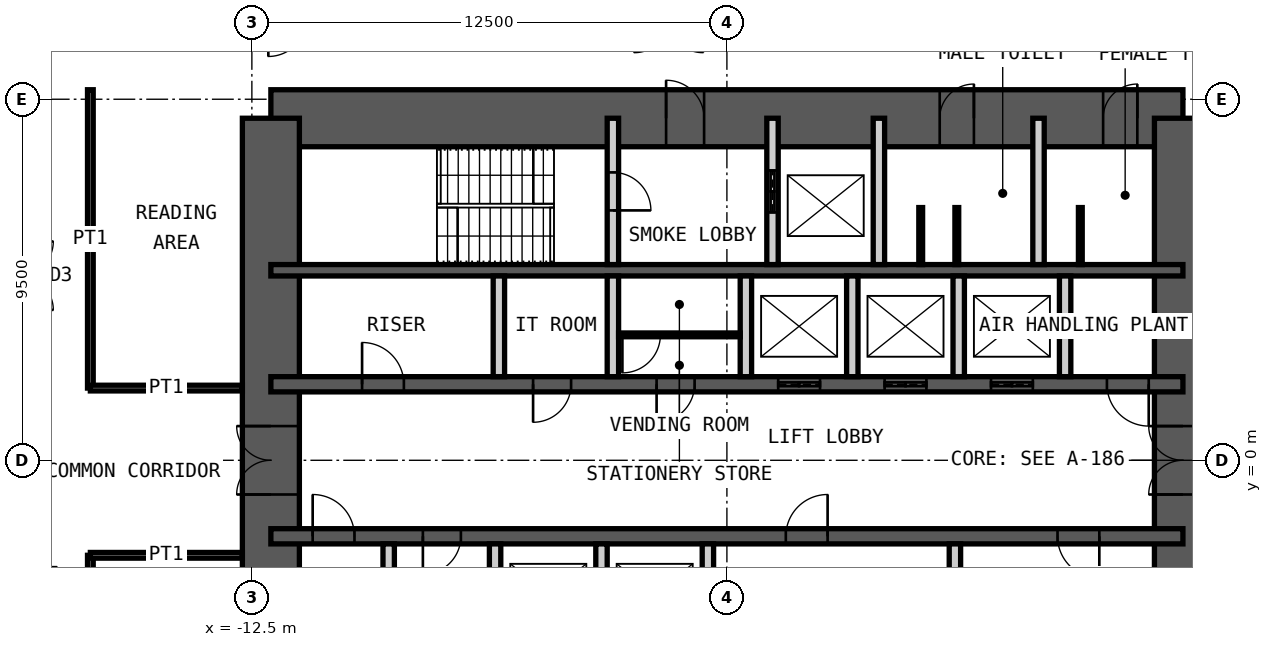
"""IFC4 building model, lengths in metres.
Left out: names, types, materials, properties, quantities, classifications, styles, units other than length and angle.
Written with IfcOpenShell. Run it as: python <this file> out.ifc"""

import sys

from ifc_helpers import new_model, si_unit, direction, frame, frame_2d, origin, place, context, subcontext, project, spatial, rectangle, extrude, element, fill, save


model = new_model("IFC4")
c1 = context("Model", 3, precision=1e-05, world=origin(), true_north=direction((0.0, 1.0)))
c2 = subcontext(c1, "Body", "Model", "MODEL_VIEW")
j1 = project(units=[si_unit("LENGTHUNIT", "METRE"), si_unit("PLANEANGLEUNIT", "RADIAN")], contexts=[c1])
p1 = place(None, origin())
s1 = spatial("IfcSite", under=j1, at=p1, CompositionType="ELEMENT")
p2 = place(p1, origin())
s2 = spatial("IfcBuilding", under=s1, at=p2, CompositionType="ELEMENT")
p3 = place(p2, frame((0.0, 0.0, 115.6)))
s3 = spatial("IfcBuildingStorey", under=s2, at=p3, CompositionType="ELEMENT", Elevation=115.6)
p4 = place(p3, frame((-12.0, 9.0, 0.0), z_axis=(0.0, 0.0, 1.0), x_axis=(1.0, 0.0, 0.0)))
e1 = element("IfcWall", 1, at=p4, inside=s3, PredefinedType="SHEAR", context=c2, shape_type="SweptSolid", body=[
    extrude(rectangle(XDim=24.0, YDim=1.5, at=frame_2d((12.0, 0.0))), origin(), (0.0, 0.0, 1.0), 4.2),
])
p5 = place(p4, frame((10.4, 0.0, 0.0)))
e2 = element("IfcOpeningElement", 2, at=p5, cuts=e1, PredefinedType="OPENING", context=c2, shape_type="SweptSolid", body=[
    extrude(rectangle(XDim=1.0, YDim=2.1, at=frame_2d((0.5, 1.05))), frame((0.0, 0.76, 0.0), z_axis=(0.0, -1.0, 0.0), x_axis=(1.0, 0.0, 0.0)), (0.0, 0.0, 1.0), 1.52),
])
p6 = place(p4, frame((17.6, 0.0, 0.0)))
e3 = element("IfcOpeningElement", 3, at=p6, cuts=e1, PredefinedType="OPENING", context=c2, shape_type="SweptSolid", body=[
    extrude(rectangle(XDim=0.9, YDim=2.1, at=frame_2d((0.45, 1.05))), frame((0.0, 0.76, 0.0), z_axis=(0.0, -1.0, 0.0), x_axis=(1.0, 0.0, 0.0)), (0.0, 0.0, 1.0), 1.52),
])
p7 = place(p4, frame((21.9, 0.0, 0.0)))
e4 = element("IfcOpeningElement", 4, at=p7, cuts=e1, PredefinedType="OPENING", context=c2, shape_type="SweptSolid", body=[
    extrude(rectangle(XDim=0.9, YDim=2.1, at=frame_2d((0.45, 1.05))), frame((0.0, 0.76, 0.0), z_axis=(0.0, -1.0, 0.0), x_axis=(1.0, 0.0, 0.0)), (0.0, 0.0, 1.0), 1.52),
])
p8 = place(p3, frame((12.0, -9.0, 0.0), z_axis=(0.0, 0.0, 1.0), x_axis=(0.0, 1.0, 0.0)))
e5 = element("IfcWall", 5, at=p8, inside=s3, PredefinedType="SHEAR", context=c2, shape_type="SweptSolid", body=[
    extrude(rectangle(XDim=18.0, YDim=1.5, at=frame_2d((9.0, 0.0))), origin(), (0.0, 0.0, 1.0), 4.2),
])
p9 = place(p8, frame((8.1, 0.0, 0.0)))
e6 = element("IfcOpeningElement", 6, at=p9, cuts=e5, PredefinedType="OPENING", context=c2, shape_type="SweptSolid", body=[
    extrude(rectangle(XDim=1.8, YDim=2.1, at=frame_2d((0.9, 1.05))), frame((0.0, 0.76, 0.0), z_axis=(0.0, -1.0, 0.0), x_axis=(1.0, 0.0, 0.0)), (0.0, 0.0, 1.0), 1.52),
])
p10 = place(p3, frame((-12.0, -9.0, 0.0), z_axis=(0.0, 0.0, 1.0), x_axis=(0.0, 1.0, 0.0)))
e7 = element("IfcWall", 7, at=p10, inside=s3, PredefinedType="SHEAR", context=c2, shape_type="SweptSolid", body=[
    extrude(rectangle(XDim=18.0, YDim=1.5, at=frame_2d((9.0, 0.0))), origin(), (0.0, 0.0, 1.0), 4.2),
])
p11 = place(p10, frame((8.1, 0.0, 0.0)))
e8 = element("IfcOpeningElement", 8, at=p11, cuts=e7, PredefinedType="OPENING", context=c2, shape_type="SweptSolid", body=[
    extrude(rectangle(XDim=1.8, YDim=2.1, at=frame_2d((0.9, 1.05))), frame((0.0, 0.76, 0.0), z_axis=(0.0, -1.0, 0.0), x_axis=(1.0, 0.0, 0.0)), (0.0, 0.0, 1.0), 1.52),
])
p12 = place(p3, frame((-12.0, 5.0, 0.0), z_axis=(0.0, 0.0, 1.0), x_axis=(1.0, 0.0, 0.0)))
e9 = element("IfcWall", 9, at=p12, inside=s3, PredefinedType="SHEAR", context=c2, shape_type="SweptSolid", body=[
    extrude(rectangle(XDim=24.0, YDim=0.3, at=frame_2d((12.0, 0.0))), origin(), (0.0, 0.0, 1.0), 4.2),
])
p13 = place(p3, frame((-12.0, 2.0, 0.0), z_axis=(0.0, 0.0, 1.0), x_axis=(1.0, 0.0, 0.0)))
e10 = element("IfcWall", 10, at=p13, inside=s3, PredefinedType="SHEAR", context=c2, shape_type="SweptSolid", body=[
    extrude(rectangle(XDim=24.0, YDim=0.4, at=frame_2d((12.0, 0.0))), origin(), (0.0, 0.0, 1.0), 4.2),
])
p14 = place(p13, frame((2.4, 0.0, 0.0)))
e11 = element("IfcOpeningElement", 11, at=p14, cuts=e10, PredefinedType="OPENING", context=c2, shape_type="SweptSolid", body=[
    extrude(rectangle(XDim=1.1, YDim=2.1, at=frame_2d((0.55, 1.05))), frame((0.0, 0.21, 0.0), z_axis=(0.0, -1.0, 0.0), x_axis=(1.0, 0.0, 0.0)), (0.0, 0.0, 1.0), 0.42),
])
p15 = place(p13, frame((22.0, 0.0, 0.0)))
e12 = element("IfcOpeningElement", 12, at=p15, cuts=e10, PredefinedType="OPENING", context=c2, shape_type="SweptSolid", body=[
    extrude(rectangle(XDim=1.1, YDim=2.1, at=frame_2d((0.55, 1.05))), frame((0.0, 0.21, 0.0), z_axis=(0.0, -1.0, 0.0), x_axis=(1.0, 0.0, 0.0)), (0.0, 0.0, 1.0), 0.42),
])
p16 = place(p13, frame((10.15, 0.0, 0.0)))
e13 = element("IfcOpeningElement", 13, at=p16, cuts=e10, PredefinedType="OPENING", context=c2, shape_type="SweptSolid", body=[
    extrude(rectangle(XDim=1.0, YDim=2.1, at=frame_2d((0.5, 1.05))), frame((0.0, 0.21, 0.0), z_axis=(0.0, -1.0, 0.0), x_axis=(1.0, 0.0, 0.0)), (0.0, 0.0, 1.0), 0.42),
])
p17 = place(p13, frame((6.9, 0.0, 0.0)))
e14 = element("IfcOpeningElement", 14, at=p17, cuts=e10, PredefinedType="OPENING", context=c2, shape_type="SweptSolid", body=[
    extrude(rectangle(XDim=1.0, YDim=2.1, at=frame_2d((0.5, 1.05))), frame((0.0, 0.21, 0.0), z_axis=(0.0, -1.0, 0.0), x_axis=(1.0, 0.0, 0.0)), (0.0, 0.0, 1.0), 0.42),
])
p18 = place(p13, frame((13.35, 0.0, 0.0)))
e15 = element("IfcOpeningElement", 15, at=p18, cuts=e10, PredefinedType="OPENING", context=c2, shape_type="SweptSolid", body=[
    extrude(rectangle(XDim=1.1, YDim=2.4, at=frame_2d((0.55, 1.2))), frame((0.0, 0.21, 0.0), z_axis=(0.0, -1.0, 0.0), x_axis=(1.0, 0.0, 0.0)), (0.0, 0.0, 1.0), 0.42),
])
p19 = place(p13, frame((16.15, 0.0, 0.0)))
e16 = element("IfcOpeningElement", 16, at=p19, cuts=e10, PredefinedType="OPENING", context=c2, shape_type="SweptSolid", body=[
    extrude(rectangle(XDim=1.1, YDim=2.4, at=frame_2d((0.55, 1.2))), frame((0.0, 0.21, 0.0), z_axis=(0.0, -1.0, 0.0), x_axis=(1.0, 0.0, 0.0)), (0.0, 0.0, 1.0), 0.42),
])
p20 = place(p13, frame((18.95, 0.0, 0.0)))
e17 = element("IfcOpeningElement", 17, at=p20, cuts=e10, PredefinedType="OPENING", context=c2, shape_type="SweptSolid", body=[
    extrude(rectangle(XDim=1.1, YDim=2.4, at=frame_2d((0.55, 1.2))), frame((0.0, 0.21, 0.0), z_axis=(0.0, -1.0, 0.0), x_axis=(1.0, 0.0, 0.0)), (0.0, 0.0, 1.0), 0.42),
])
p21 = place(p3, frame((-12.0, -2.0, 0.0), z_axis=(0.0, 0.0, 1.0), x_axis=(1.0, 0.0, 0.0)))
e18 = element("IfcWall", 18, at=p21, inside=s3, PredefinedType="SHEAR", context=c2, shape_type="SweptSolid", body=[
    extrude(rectangle(XDim=24.0, YDim=0.4, at=frame_2d((12.0, 0.0))), origin(), (0.0, 0.0, 1.0), 4.2),
])
p22 = place(p21, frame((1.1, 0.0, 0.0)))
e19 = element("IfcOpeningElement", 19, at=p22, cuts=e18, PredefinedType="OPENING", context=c2, shape_type="SweptSolid", body=[
    extrude(rectangle(XDim=1.1, YDim=2.1, at=frame_2d((0.55, 1.05))), frame((0.0, 0.21, 0.0), z_axis=(0.0, -1.0, 0.0), x_axis=(1.0, 0.0, 0.0)), (0.0, 0.0, 1.0), 0.42),
])
p23 = place(p21, frame((13.55, 0.0, 0.0)))
e20 = element("IfcOpeningElement", 20, at=p23, cuts=e18, PredefinedType="OPENING", context=c2, shape_type="SweptSolid", body=[
    extrude(rectangle(XDim=1.1, YDim=2.1, at=frame_2d((0.55, 1.05))), frame((0.0, 0.21, 0.0), z_axis=(0.0, -1.0, 0.0), x_axis=(1.0, 0.0, 0.0)), (0.0, 0.0, 1.0), 0.42),
])
p24 = place(p21, frame((20.7, 0.0, 0.0)))
e21 = element("IfcOpeningElement", 21, at=p24, cuts=e18, PredefinedType="OPENING", context=c2, shape_type="SweptSolid", body=[
    extrude(rectangle(XDim=1.1, YDim=2.1, at=frame_2d((0.55, 1.05))), frame((0.0, 0.21, 0.0), z_axis=(0.0, -1.0, 0.0), x_axis=(1.0, 0.0, 0.0)), (0.0, 0.0, 1.0), 0.42),
])
p25 = place(p21, frame((4.0, 0.0, 0.0)))
e22 = element("IfcOpeningElement", 22, at=p25, cuts=e18, PredefinedType="OPENING", context=c2, shape_type="SweptSolid", body=[
    extrude(rectangle(XDim=1.0, YDim=2.1, at=frame_2d((0.5, 1.05))), frame((0.0, 0.21, 0.0), z_axis=(0.0, -1.0, 0.0), x_axis=(1.0, 0.0, 0.0)), (0.0, 0.0, 1.0), 0.42),
])
p26 = place(p3, frame((-3.0, 5.15, 0.0), z_axis=(0.0, 0.0, 1.0), x_axis=(0.0, 1.0, 0.0)))
e23 = element("IfcWall", 23, at=p26, inside=s3, PredefinedType="PARTITIONING", context=c2, shape_type="SweptSolid", body=[
    extrude(rectangle(XDim=3.85, YDim=0.3, at=frame_2d((1.925, 0.0))), origin(), (0.0, 0.0, 1.0), 3.98),
])
p27 = place(p26, frame((1.425, 0.0, 0.0)))
e24 = element("IfcOpeningElement", 24, at=p27, cuts=e23, PredefinedType="OPENING", context=c2, shape_type="SweptSolid", body=[
    extrude(rectangle(XDim=1.0, YDim=2.1, at=frame_2d((0.5, 1.05))), frame((0.0, 0.16, 0.0), z_axis=(0.0, -1.0, 0.0), x_axis=(1.0, 0.0, 0.0)), (0.0, 0.0, 1.0), 0.32),
])
p28 = place(p3, frame((1.2, 5.15, 0.0), z_axis=(0.0, 0.0, 1.0), x_axis=(0.0, 1.0, 0.0)))
e25 = element("IfcWall", 25, at=p28, inside=s3, PredefinedType="PARTITIONING", context=c2, shape_type="SweptSolid", body=[
    extrude(rectangle(XDim=3.85, YDim=0.3, at=frame_2d((1.925, 0.0))), origin(), (0.0, 0.0, 1.0), 3.98),
])
p29 = place(p28, frame((1.375, 0.0, 0.0)))
e26 = element("IfcOpeningElement", 26, at=p29, cuts=e25, PredefinedType="OPENING", context=c2, shape_type="SweptSolid", body=[
    extrude(rectangle(XDim=1.1, YDim=2.4, at=frame_2d((0.55, 1.2))), frame((0.0, 0.16, 0.0), z_axis=(0.0, -1.0, 0.0), x_axis=(1.0, 0.0, 0.0)), (0.0, 0.0, 1.0), 0.32),
])
for number, where, z_axis, x_axis in (
    (27, (4.0, 5.15, 0.0), (0.0, 0.0, 1.0), (0.0, 1.0, 0.0)),
    (28, (8.2, 5.15, 0.0), (0.0, 0.0, 1.0), (0.0, 1.0, 0.0)),
):
    element("IfcWall", number, at=place(p3, frame(where, z_axis=z_axis, x_axis=x_axis)), inside=s3, PredefinedType="PARTITIONING", context=c2, shape_type="SweptSolid", body=[
        extrude(rectangle(XDim=3.85, YDim=0.3, at=frame_2d((1.925, 0.0))), origin(), (0.0, 0.0, 1.0), 3.98),
    ])
for number, where, z_axis, x_axis in (
    (29, (-6.0, 2.2, 0.0), (0.0, 0.0, 1.0), (0.0, 1.0, 0.0)),
    (30, (-3.0, 2.2, 0.0), (0.0, 0.0, 1.0), (0.0, 1.0, 0.0)),
    (31, (0.5, 2.2, 0.0), (0.0, 0.0, 1.0), (0.0, 1.0, 0.0)),
    (32, (3.3, 2.2, 0.0), (0.0, 0.0, 1.0), (0.0, 1.0, 0.0)),
    (33, (6.1, 2.2, 0.0), (0.0, 0.0, 1.0), (0.0, 1.0, 0.0)),
    (34, (8.9, 2.2, 0.0), (0.0, 0.0, 1.0), (0.0, 1.0, 0.0)),
    (35, (-8.9, -4.85, 0.0), (0.0, 0.0, 1.0), (0.0, 1.0, 0.0)),
    (36, (-6.1, -4.85, 0.0), (0.0, 0.0, 1.0), (0.0, 1.0, 0.0)),
    (37, (-3.3, -4.85, 0.0), (0.0, 0.0, 1.0), (0.0, 1.0, 0.0)),
    (38, (-0.5, -4.85, 0.0), (0.0, 0.0, 1.0), (0.0, 1.0, 0.0)),
    (39, (6.0, -4.85, 0.0), (0.0, 0.0, 1.0), (0.0, 1.0, 0.0)),
):
    element("IfcWall", number, at=place(p3, frame(where, z_axis=z_axis, x_axis=x_axis)), inside=s3, PredefinedType="PARTITIONING", context=c2, shape_type="SweptSolid", body=[
        extrude(rectangle(XDim=2.65, YDim=0.3, at=frame_2d((1.325, 0.0))), origin(), (0.0, 0.0, 1.0), 3.98),
    ])
p30 = place(p3, frame((-2.85, 3.3, 0.0), z_axis=(0.0, 0.0, 1.0), x_axis=(1.0, 0.0, 0.0)))
e40 = element("IfcWall", 40, at=p30, inside=s3, PredefinedType="PARTITIONING", context=c2, shape_type="SweptSolid", body=[
    extrude(rectangle(XDim=3.2, YDim=0.1, at=frame_2d((1.6, 0.0))), origin(), (0.0, 0.0, 1.0), 3.98),
])
p31 = place(p30, frame((0.1, 0.0, 0.0)))
e41 = element("IfcOpeningElement", 41, at=p31, cuts=e40, PredefinedType="OPENING", context=c2, shape_type="SweptSolid", body=[
    extrude(rectangle(XDim=1.0, YDim=2.4, at=frame_2d((0.5, 1.2))), frame((0.0, 0.06, 0.0), z_axis=(0.0, -1.0, 0.0), x_axis=(1.0, 0.0, 0.0)), (0.0, 0.0, 1.0), 0.12),
])
for number, where, z_axis, x_axis in (
    (42, (5.1, 5.15, 0.0), (0.0, 0.0, 1.0), (0.0, 1.0, 0.0)),
    (43, (6.05, 5.15, 0.0), (0.0, 0.0, 1.0), (0.0, 1.0, 0.0)),
    (44, (9.3, 5.15, 0.0), (0.0, 0.0, 1.0), (0.0, 1.0, 0.0)),
):
    element("IfcWall", number, at=place(p3, frame(where, z_axis=z_axis, x_axis=x_axis)), inside=s3, PredefinedType="PARTITIONING", context=c2, shape_type="SweptSolid", body=[
        extrude(rectangle(XDim=1.5, YDim=0.1, at=frame_2d((0.75, 0.0))), origin(), (0.0, 0.0, 1.0), 2.1),
    ])
p32 = place(p3, frame((-16.75, 1.9, 0.0), z_axis=(0.0, 0.0, 1.0), x_axis=(0.0, 1.0, 0.0)))
e45 = element("IfcWall", 45, at=p32, inside=s3, PredefinedType="PARTITIONING", context=c2, shape_type="SweptSolid", body=[
    extrude(rectangle(XDim=7.85, YDim=0.15, at=frame_2d((3.925, 0.0))), origin(), (0.0, 0.0, 1.0), 4.03),
])
p33 = place(p3, frame((-12.75, 1.9, 0.0), z_axis=(0.0, 0.0, 1.0), x_axis=(-1.0, 0.0, 0.0)))
e46 = element("IfcWall", 46, at=p33, inside=s3, PredefinedType="PARTITIONING", context=c2, shape_type="SweptSolid", body=[
    extrude(rectangle(XDim=4.0, YDim=0.15, at=frame_2d((2.0, 0.0))), origin(), (0.0, 0.0, 1.0), 3.33),
])
p34 = place(p3, frame((-16.75, -9.75, 0.0), z_axis=(0.0, 0.0, 1.0), x_axis=(0.0, 1.0, 0.0)))
e47 = element("IfcWall", 47, at=p34, inside=s3, PredefinedType="PARTITIONING", context=c2, shape_type="SweptSolid", body=[
    extrude(rectangle(XDim=7.25, YDim=0.15, at=frame_2d((3.625, 0.0))), origin(), (0.0, 0.0, 1.0), 4.03),
])
p35 = place(p3, frame((-12.75, -2.5, 0.0), z_axis=(0.0, 0.0, 1.0), x_axis=(-1.0, 0.0, 0.0)))
e48 = element("IfcWall", 48, at=p35, inside=s3, PredefinedType="PARTITIONING", context=c2, shape_type="SweptSolid", body=[
    extrude(rectangle(XDim=4.0, YDim=0.15, at=frame_2d((2.0, 0.0))), origin(), (0.0, 0.0, 1.0), 3.33),
])
p36 = place(p5, origin())
e49 = element("IfcDoor", 49, at=p36, inside=s3, OperationType="SINGLE_SWING_RIGHT", PredefinedType="DOOR", context=c2, shape_type="SweptSolid", body=[
    extrude(rectangle(XDim=1.0, YDim=2.1, at=frame_2d((0.5, 1.05))), frame((0.0, 0.025, 0.0), z_axis=(0.0, -1.0, 0.0), x_axis=(1.0, 0.0, 0.0)), (0.0, 0.0, 1.0), 0.05),
])
fill(e2, e49)
p37 = place(p6, origin())
e50 = element("IfcDoor", 50, at=p37, inside=s3, OperationType="SINGLE_SWING_LEFT", PredefinedType="DOOR", context=c2, shape_type="SweptSolid", body=[
    extrude(rectangle(XDim=0.9, YDim=2.1, at=frame_2d((0.45, 1.05))), frame((0.0, 0.025, 0.0), z_axis=(0.0, -1.0, 0.0), x_axis=(1.0, 0.0, 0.0)), (0.0, 0.0, 1.0), 0.05),
])
fill(e3, e50)
p38 = place(p7, origin())
e51 = element("IfcDoor", 51, at=p38, inside=s3, OperationType="SINGLE_SWING_LEFT", PredefinedType="DOOR", context=c2, shape_type="SweptSolid", body=[
    extrude(rectangle(XDim=0.9, YDim=2.1, at=frame_2d((0.45, 1.05))), frame((0.0, 0.025, 0.0), z_axis=(0.0, -1.0, 0.0), x_axis=(1.0, 0.0, 0.0)), (0.0, 0.0, 1.0), 0.05),
])
fill(e4, e51)
p39 = place(p27, origin())
e52 = element("IfcDoor", 52, at=p39, inside=s3, OperationType="SINGLE_SWING_LEFT", PredefinedType="DOOR", context=c2, shape_type="SweptSolid", body=[
    extrude(rectangle(XDim=1.0, YDim=2.1, at=frame_2d((0.5, 1.05))), frame((0.0, 0.025, 0.0), z_axis=(0.0, -1.0, 0.0), x_axis=(1.0, 0.0, 0.0)), (0.0, 0.0, 1.0), 0.05),
])
fill(e24, e52)
p40 = place(p14, origin())
e53 = element("IfcDoor", 53, at=p40, inside=s3, OperationType="SINGLE_SWING_RIGHT", PredefinedType="DOOR", context=c2, shape_type="SweptSolid", body=[
    extrude(rectangle(XDim=1.1, YDim=2.1, at=frame_2d((0.55, 1.05))), frame((0.0, 0.025, 0.0), z_axis=(0.0, -1.0, 0.0), x_axis=(1.0, 0.0, 0.0)), (0.0, 0.0, 1.0), 0.05),
])
fill(e11, e53)
p41 = place(p22, origin())
e54 = element("IfcDoor", 54, at=p41, inside=s3, OperationType="SINGLE_SWING_RIGHT", PredefinedType="DOOR", context=c2, shape_type="SweptSolid", body=[
    extrude(rectangle(XDim=1.1, YDim=2.1, at=frame_2d((0.55, 1.05))), frame((0.0, 0.025, 0.0), z_axis=(0.0, -1.0, 0.0), x_axis=(1.0, 0.0, 0.0)), (0.0, 0.0, 1.0), 0.05),
])
fill(e19, e54)
p42 = place(p15, origin())
e55 = element("IfcDoor", 55, at=p42, inside=s3, OperationType="SINGLE_SWING_RIGHT", PredefinedType="DOOR", context=c2, shape_type="SweptSolid", body=[
    extrude(rectangle(XDim=1.1, YDim=2.1, at=frame_2d((0.55, 1.05))), frame((0.0, 0.025, 0.0), z_axis=(0.0, -1.0, 0.0), x_axis=(1.0, 0.0, 0.0)), (0.0, 0.0, 1.0), 0.05),
])
fill(e12, e55)
p43 = place(p16, origin())
e56 = element("IfcDoor", 56, at=p43, inside=s3, OperationType="SINGLE_SWING_LEFT", PredefinedType="DOOR", context=c2, shape_type="SweptSolid", body=[
    extrude(rectangle(XDim=1.0, YDim=2.1, at=frame_2d((0.5, 1.05))), frame((0.0, 0.025, 0.0), z_axis=(0.0, -1.0, 0.0), x_axis=(1.0, 0.0, 0.0)), (0.0, 0.0, 1.0), 0.05),
])
fill(e13, e56)
p44 = place(p23, origin())
e57 = element("IfcDoor", 57, at=p44, inside=s3, OperationType="SINGLE_SWING_LEFT", PredefinedType="DOOR", context=c2, shape_type="SweptSolid", body=[
    extrude(rectangle(XDim=1.1, YDim=2.1, at=frame_2d((0.55, 1.05))), frame((0.0, 0.025, 0.0), z_axis=(0.0, -1.0, 0.0), x_axis=(1.0, 0.0, 0.0)), (0.0, 0.0, 1.0), 0.05),
])
fill(e20, e57)
p45 = place(p24, origin())
e58 = element("IfcDoor", 58, at=p45, inside=s3, OperationType="SINGLE_SWING_RIGHT", PredefinedType="DOOR", context=c2, shape_type="SweptSolid", body=[
    extrude(rectangle(XDim=1.1, YDim=2.1, at=frame_2d((0.55, 1.05))), frame((0.0, 0.025, 0.0), z_axis=(0.0, -1.0, 0.0), x_axis=(1.0, 0.0, 0.0)), (0.0, 0.0, 1.0), 0.05),
])
fill(e21, e58)
p46 = place(p9, origin())
e59 = element("IfcDoor", 59, at=p46, inside=s3, OperationType="DOUBLE_DOOR_DOUBLE_SWING", PredefinedType="DOOR", context=c2, shape_type="SweptSolid", body=[
    extrude(rectangle(XDim=1.8, YDim=2.1, at=frame_2d((0.9, 1.05))), frame((0.0, 0.025, 0.0), z_axis=(0.0, -1.0, 0.0), x_axis=(1.0, 0.0, 0.0)), (0.0, 0.0, 1.0), 0.05),
])
fill(e6, e59)
p47 = place(p11, origin())
e60 = element("IfcDoor", 60, at=p47, inside=s3, OperationType="DOUBLE_DOOR_DOUBLE_SWING", PredefinedType="DOOR", context=c2, shape_type="SweptSolid", body=[
    extrude(rectangle(XDim=1.8, YDim=2.1, at=frame_2d((0.9, 1.05))), frame((0.0, 0.025, 0.0), z_axis=(0.0, -1.0, 0.0), x_axis=(1.0, 0.0, 0.0)), (0.0, 0.0, 1.0), 0.05),
])
fill(e8, e60)
p48 = place(p29, origin())
e61 = element("IfcDoor", 61, at=p48, inside=s3, OperationType="DOUBLE_DOOR_SLIDING", PredefinedType="DOOR", context=c2, shape_type="SweptSolid", body=[
    extrude(rectangle(XDim=1.1, YDim=2.4, at=frame_2d((0.55, 1.2))), frame((0.0, 0.025, 0.0), z_axis=(0.0, -1.0, 0.0), x_axis=(1.0, 0.0, 0.0)), (0.0, 0.0, 1.0), 0.05),
])
fill(e26, e61)
p49 = place(p17, origin())
e62 = element("IfcDoor", 62, at=p49, inside=s3, OperationType="SINGLE_SWING_LEFT", PredefinedType="DOOR", context=c2, shape_type="SweptSolid", body=[
    extrude(rectangle(XDim=1.0, YDim=2.1, at=frame_2d((0.5, 1.05))), frame((0.0, 0.025, 0.0), z_axis=(0.0, -1.0, 0.0), x_axis=(1.0, 0.0, 0.0)), (0.0, 0.0, 1.0), 0.05),
])
fill(e14, e62)
p50 = place(p18, origin())
e63 = element("IfcDoor", 63, at=p50, inside=s3, OperationType="DOUBLE_DOOR_SLIDING", PredefinedType="DOOR", context=c2, shape_type="SweptSolid", body=[
    extrude(rectangle(XDim=1.1, YDim=2.4, at=frame_2d((0.55, 1.2))), frame((0.0, 0.025, 0.0), z_axis=(0.0, -1.0, 0.0), x_axis=(1.0, 0.0, 0.0)), (0.0, 0.0, 1.0), 0.05),
])
fill(e15, e63)
p51 = place(p19, origin())
e64 = element("IfcDoor", 64, at=p51, inside=s3, OperationType="DOUBLE_DOOR_SLIDING", PredefinedType="DOOR", context=c2, shape_type="SweptSolid", body=[
    extrude(rectangle(XDim=1.1, YDim=2.4, at=frame_2d((0.55, 1.2))), frame((0.0, 0.025, 0.0), z_axis=(0.0, -1.0, 0.0), x_axis=(1.0, 0.0, 0.0)), (0.0, 0.0, 1.0), 0.05),
])
fill(e16, e64)
p52 = place(p20, origin())
e65 = element("IfcDoor", 65, at=p52, inside=s3, OperationType="DOUBLE_DOOR_SLIDING", PredefinedType="DOOR", context=c2, shape_type="SweptSolid", body=[
    extrude(rectangle(XDim=1.1, YDim=2.4, at=frame_2d((0.55, 1.2))), frame((0.0, 0.025, 0.0), z_axis=(0.0, -1.0, 0.0), x_axis=(1.0, 0.0, 0.0)), (0.0, 0.0, 1.0), 0.05),
])
fill(e17, e65)
p53 = place(p25, origin())
e66 = element("IfcDoor", 66, at=p53, inside=s3, OperationType="SINGLE_SWING_LEFT", PredefinedType="DOOR", context=c2, shape_type="SweptSolid", body=[
    extrude(rectangle(XDim=1.0, YDim=2.1, at=frame_2d((0.5, 1.05))), frame((0.0, 0.025, 0.0), z_axis=(0.0, -1.0, 0.0), x_axis=(1.0, 0.0, 0.0)), (0.0, 0.0, 1.0), 0.05),
])
fill(e22, e66)
p54 = place(p31, origin())
e67 = element("IfcDoor", 67, at=p54, inside=s3, OperationType="SINGLE_SWING_LEFT", PredefinedType="DOOR", context=c2, shape_type="SweptSolid", body=[
    extrude(rectangle(XDim=1.0, YDim=2.4, at=frame_2d((0.5, 1.2))), frame((0.0, 0.025, 0.0), z_axis=(0.0, -1.0, 0.0), x_axis=(1.0, 0.0, 0.0)), (0.0, 0.0, 1.0), 0.05),
])
fill(e41, e67)
save(model, sys.argv[1])
